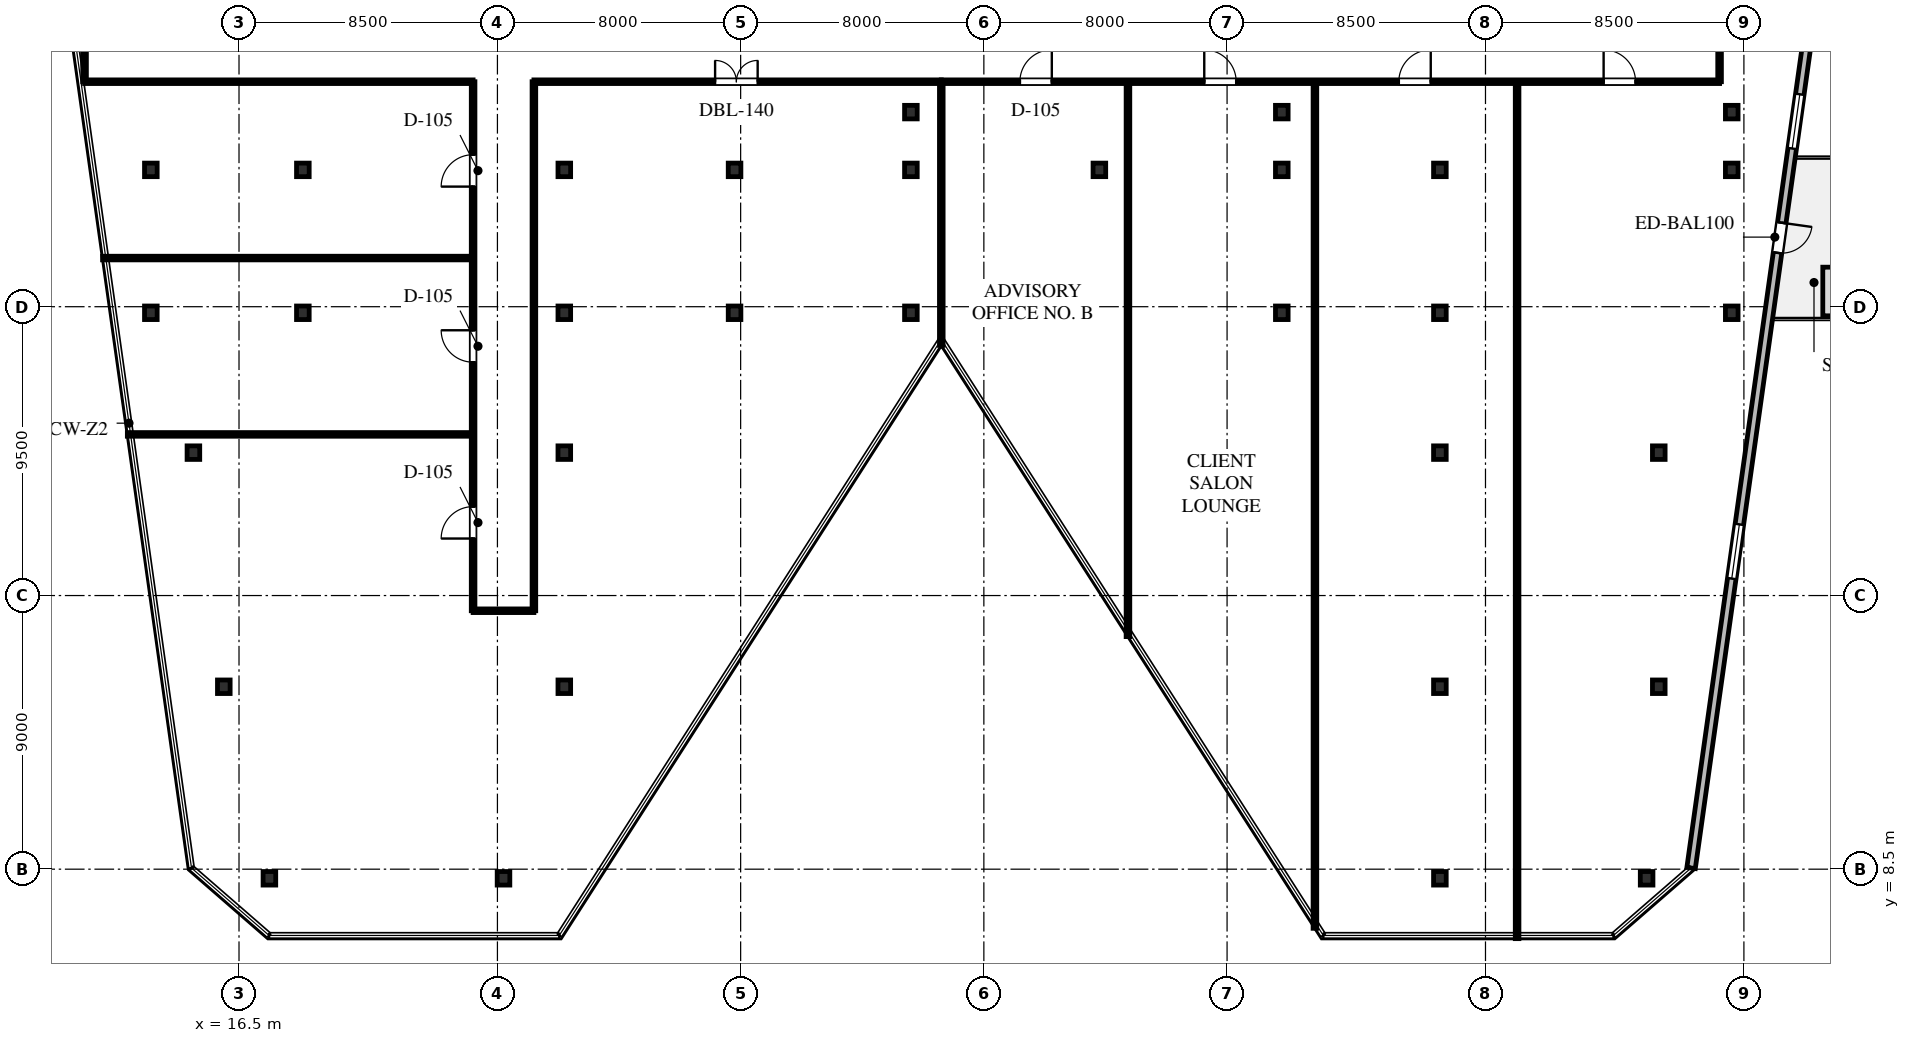
"""IFC4 building model, lengths in metres.
Left out: names, types, materials, properties, quantities, classifications, styles, units other than length and angle.
Written with IfcOpenShell. Run it as: python <this file> out.ifc"""

import sys

from ifc_helpers import new_model, si_unit, direction, frame, frame_2d, origin, origin_2d, place, context, subcontext, project, spatial, rectangle, i_section, extrude, element, fill, save


model = new_model("IFC4")
c1 = context("Model", 3, precision=1e-05, world=origin(), true_north=direction((0.0, 1.0)))
c2 = subcontext(c1, "Body", "Model", "MODEL_VIEW")
j1 = project(units=[si_unit("LENGTHUNIT", "METRE"), si_unit("PLANEANGLEUNIT", "RADIAN")], contexts=[c1])
p1 = place(None, origin())
s1 = spatial("IfcSite", under=j1, at=p1, CompositionType="ELEMENT")
p2 = place(p1, origin())
s2 = spatial("IfcBuilding", under=s1, at=p2, CompositionType="ELEMENT")
p3 = place(p2, frame((0.0, 0.0, 136.0)))
s3 = spatial("IfcBuildingStorey", under=s2, at=p3, CompositionType="ELEMENT", Elevation=136.0)
for number, where, z_axis, x_axis in (
    (1, (17.5, 8.2, 0.0), (0.0, 0.0, 1.0), (1.0, 0.0, 0.0)),
    (2, (13.6, 26.8, 0.0), (0.0, 0.0, 1.0), (1.0, 0.0, 0.0)),
    (3, (18.6, 26.8, 0.0), (0.0, 0.0, 1.0), (1.0, 0.0, 0.0)),
    (4, (27.2, 26.8, 0.0), (0.0, 0.0, 1.0), (1.0, 0.0, 0.0)),
    (5, (32.8, 26.8, 0.0), (0.0, 0.0, 1.0), (1.0, 0.0, 0.0)),
    (6, (38.6, 26.8, 0.0), (0.0, 0.0, 1.0), (1.0, 0.0, 0.0)),
    (7, (50.8, 26.8, 0.0), (0.0, 0.0, 1.0), (1.0, 0.0, 0.0)),
    (8, (56.0, 26.8, 0.0), (0.0, 0.0, 1.0), (1.0, 0.0, 0.0)),
    (9, (65.6, 26.8, 0.0), (0.0, 0.0, 1.0), (1.0, 0.0, 0.0)),
    (10, (13.6, 31.5, 0.0), (0.0, 0.0, 1.0), (1.0, 0.0, 0.0)),
    (11, (18.6, 31.5, 0.0), (0.0, 0.0, 1.0), (1.0, 0.0, 0.0)),
    (12, (27.2, 31.5, 0.0), (0.0, 0.0, 1.0), (1.0, 0.0, 0.0)),
    (13, (25.2, 8.2, 0.0), (0.0, 0.0, 1.0), (1.0, 0.0, 0.0)),
    (14, (32.8, 31.5, 0.0), (0.0, 0.0, 1.0), (1.0, 0.0, 0.0)),
    (15, (38.6, 31.5, 0.0), (0.0, 0.0, 1.0), (1.0, 0.0, 0.0)),
    (16, (44.8, 31.5, 0.0), (0.0, 0.0, 1.0), (1.0, 0.0, 0.0)),
    (17, (50.8, 31.5, 0.0), (0.0, 0.0, 1.0), (1.0, 0.0, 0.0)),
    (18, (56.0, 31.5, 0.0), (0.0, 0.0, 1.0), (1.0, 0.0, 0.0)),
    (19, (65.6, 31.5, 0.0), (0.0, 0.0, 1.0), (1.0, 0.0, 0.0)),
    (20, (56.0, 8.2, 0.0), (0.0, 0.0, 1.0), (1.0, 0.0, 0.0)),
    (21, (62.8, 8.2, 0.0), (0.0, 0.0, 1.0), (1.0, 0.0, 0.0)),
    (22, (16.0, 14.5, 0.0), (0.0, 0.0, 1.0), (1.0, 0.0, 0.0)),
    (23, (27.2, 14.5, 0.0), (0.0, 0.0, 1.0), (1.0, 0.0, 0.0)),
    (24, (56.0, 14.5, 0.0), (0.0, 0.0, 1.0), (1.0, 0.0, 0.0)),
    (25, (63.2, 14.5, 0.0), (0.0, 0.0, 1.0), (1.0, 0.0, 0.0)),
    (26, (15.0, 22.2, 0.0), (0.0, 0.0, 1.0), (1.0, 0.0, 0.0)),
    (27, (27.2, 22.2, 0.0), (0.0, 0.0, 1.0), (1.0, 0.0, 0.0)),
    (28, (56.0, 22.2, 0.0), (0.0, 0.0, 1.0), (1.0, 0.0, 0.0)),
    (29, (63.2, 22.2, 0.0), (0.0, 0.0, 1.0), (1.0, 0.0, 0.0)),
    (30, (38.6, 33.4, 0.0), (0.0, 0.0, 1.0), (1.0, 0.0, 0.0)),
    (31, (50.8, 33.4, 0.0), (0.0, 0.0, 1.0), (1.0, 0.0, 0.0)),
    (32, (65.6, 33.4, 0.0), (0.0, 0.0, 1.0), (1.0, 0.0, 0.0)),
):
    element("IfcColumn", number, at=place(p3, frame(where, z_axis=z_axis, x_axis=x_axis)), inside=s3, PredefinedType="COLUMN", context=c2, shape_type="SweptSolid", body=[
        extrude(i_section(OverallWidth=0.416, OverallDepth=0.446, WebThickness=0.039, FlangeThickness=0.063, FilletRadius=0.03, at=origin_2d()), origin(), (0.0, 0.0, 1.0), 4.0),
    ])
p4 = place(p3, frame((68.375, 37.8, 0.0), z_axis=(0.0, 0.0, 1.0), x_axis=(-0.13917001236, -0.990268502811, 0.0)))
e33 = element("IfcWall", 33, at=p4, inside=s3, PredefinedType="STANDARD", context=c2, shape_type="SweptSolid", body=[
    extrude(rectangle(XDim=29.549, YDim=0.28, at=frame_2d((14.774, 0.0))), origin(), (0.0, 0.0, 1.0), 3.75),
])
p5 = place(p4, frame((8.117, 0.0, 0.0)))
e34 = element("IfcOpeningElement", 34, at=p5, cuts=e33, PredefinedType="OPENING", context=c2, shape_type="SweptSolid", body=[
    extrude(rectangle(XDim=1.0, YDim=2.15, at=frame_2d((0.5, 1.075))), frame((0.0, 0.15, 0.0), z_axis=(0.0, -1.0, 0.0), x_axis=(1.0, 0.0, 0.0)), (0.0, 0.0, 1.0), 0.3),
])
p6 = place(p4, frame((3.851, 0.0, 0.65)))
e35 = element("IfcOpeningElement", 35, at=p6, cuts=e33, PredefinedType="OPENING", context=c2, shape_type="SweptSolid", body=[
    extrude(rectangle(XDim=1.8, YDim=2.1, at=frame_2d((0.9, 1.05))), frame((0.0, 0.15, 0.0), z_axis=(0.0, -1.0, 0.0), x_axis=(1.0, 0.0, 0.0)), (0.0, 0.0, 1.0), 0.3),
])
p7 = place(p4, frame((18.136, 0.0, 0.65)))
e36 = element("IfcOpeningElement", 36, at=p7, cuts=e33, PredefinedType="OPENING", context=c2, shape_type="SweptSolid", body=[
    extrude(rectangle(XDim=1.8, YDim=2.1, at=frame_2d((0.9, 1.05))), frame((0.0, 0.15, 0.0), z_axis=(0.0, -1.0, 0.0), x_axis=(1.0, 0.0, 0.0)), (0.0, 0.0, 1.0), 0.3),
])
p8 = place(p3, frame((11.42, 34.4, 0.0), z_axis=(0.0, 0.0, 1.0), x_axis=(1.0, 0.0, 0.0)))
e37 = element("IfcWall", 37, at=p8, inside=s3, PredefinedType="PARTITIONING", context=c2, shape_type="SweptSolid", body=[
    extrude(rectangle(XDim=12.78, YDim=0.12, at=frame_2d((6.39, 0.0))), origin(), (0.0, 0.0, 1.0), 2.894),
])
p9 = place(p3, frame((26.2, 34.4, 0.0), z_axis=(0.0, 0.0, 1.0), x_axis=(1.0, 0.0, 0.0)))
e38 = element("IfcWall", 38, at=p9, inside=s3, PredefinedType="PARTITIONING", context=c2, shape_type="SweptSolid", body=[
    extrude(rectangle(XDim=13.4, YDim=0.12, at=frame_2d((6.7, 0.0))), origin(), (0.0, 0.0, 1.0), 2.894),
])
p10 = place(p9, frame((5.96, 0.0, 0.0)))
e39 = element("IfcOpeningElement", 39, at=p10, cuts=e38, PredefinedType="OPENING", context=c2, shape_type="SweptSolid", body=[
    extrude(rectangle(XDim=1.4, YDim=2.2, at=frame_2d((0.7, 1.1))), frame((0.0, 0.07, 0.0), z_axis=(0.0, -1.0, 0.0), x_axis=(1.0, 0.0, 0.0)), (0.0, 0.0, 1.0), 0.14),
])
p11 = place(p3, frame((39.6, 34.4, 0.0), z_axis=(0.0, 0.0, 1.0), x_axis=(1.0, 0.0, 0.0)))
e40 = element("IfcWall", 40, at=p11, inside=s3, PredefinedType="PARTITIONING", context=c2, shape_type="SweptSolid", body=[
    extrude(rectangle(XDim=25.6, YDim=0.12, at=frame_2d((12.8, 0.0))), origin(), (0.0, 0.0, 1.0), 2.894),
])
p12 = place(p11, frame((2.585, 0.0, 0.0)))
e41 = element("IfcOpeningElement", 41, at=p12, cuts=e40, PredefinedType="OPENING", context=c2, shape_type="SweptSolid", body=[
    extrude(rectangle(XDim=1.05, YDim=2.2, at=frame_2d((0.525, 1.1))), frame((0.0, 0.07, 0.0), z_axis=(0.0, -1.0, 0.0), x_axis=(1.0, 0.0, 0.0)), (0.0, 0.0, 1.0), 0.14),
])
p13 = place(p11, frame((8.65, 0.0, 0.0)))
e42 = element("IfcOpeningElement", 42, at=p13, cuts=e40, PredefinedType="OPENING", context=c2, shape_type="SweptSolid", body=[
    extrude(rectangle(XDim=1.05, YDim=2.2, at=frame_2d((0.525, 1.1))), frame((0.0, 0.07, 0.0), z_axis=(0.0, -1.0, 0.0), x_axis=(1.0, 0.0, 0.0)), (0.0, 0.0, 1.0), 0.14),
])
p14 = place(p11, frame((15.05, 0.0, 0.0)))
e43 = element("IfcOpeningElement", 43, at=p14, cuts=e40, PredefinedType="OPENING", context=c2, shape_type="SweptSolid", body=[
    extrude(rectangle(XDim=1.05, YDim=2.2, at=frame_2d((0.525, 1.1))), frame((0.0, 0.07, 0.0), z_axis=(0.0, -1.0, 0.0), x_axis=(1.0, 0.0, 0.0)), (0.0, 0.0, 1.0), 0.14),
])
p15 = place(p11, frame((21.786, 0.0, 0.0)))
e44 = element("IfcOpeningElement", 44, at=p15, cuts=e40, PredefinedType="OPENING", context=c2, shape_type="SweptSolid", body=[
    extrude(rectangle(XDim=1.05, YDim=2.2, at=frame_2d((0.525, 1.1))), frame((0.0, 0.07, 0.0), z_axis=(0.0, -1.0, 0.0), x_axis=(1.0, 0.0, 0.0)), (0.0, 0.0, 1.0), 0.14),
])
p16 = place(p3, frame((11.42, 34.4, 0.0), z_axis=(0.0, 0.0, 1.0), x_axis=(0.0, 1.0, 0.0)))
e45 = element("IfcWall", 45, at=p16, inside=s3, PredefinedType="PARTITIONING", context=c2, shape_type="SweptSolid", body=[
    extrude(rectangle(XDim=3.65, YDim=0.12, at=frame_2d((1.825, 0.0))), origin(), (0.0, 0.0, 1.0), 3.75),
])
p17 = place(p3, frame((65.2, 34.4, 0.0), z_axis=(0.0, 0.0, 1.0), x_axis=(0.0, 1.0, 0.0)))
e46 = element("IfcWall", 46, at=p17, inside=s3, PredefinedType="PARTITIONING", context=c2, shape_type="SweptSolid", body=[
    extrude(rectangle(XDim=3.267, YDim=0.12, at=frame_2d((1.634, 0.0))), origin(), (0.0, 0.0, 1.0), 2.894),
])
p18 = place(p3, frame((24.2, 17.0, 0.0), z_axis=(0.0, 0.0, 1.0), x_axis=(0.0, 1.0, 0.0)))
e47 = element("IfcWall", 47, at=p18, inside=s3, PredefinedType="PARTITIONING", context=c2, shape_type="SweptSolid", body=[
    extrude(rectangle(XDim=17.4, YDim=0.12, at=frame_2d((8.7, 0.0))), origin(), (0.0, 0.0, 1.0), 2.894),
])
p19 = place(p18, frame((2.375, 0.0, 0.0)))
e48 = element("IfcOpeningElement", 48, at=p19, cuts=e47, PredefinedType="OPENING", context=c2, shape_type="SweptSolid", body=[
    extrude(rectangle(XDim=1.05, YDim=2.2, at=frame_2d((0.525, 1.1))), frame((0.0, 0.07, 0.0), z_axis=(0.0, -1.0, 0.0), x_axis=(1.0, 0.0, 0.0)), (0.0, 0.0, 1.0), 0.14),
])
p20 = place(p18, frame((8.175, 0.0, 0.0)))
e49 = element("IfcOpeningElement", 49, at=p20, cuts=e47, PredefinedType="OPENING", context=c2, shape_type="SweptSolid", body=[
    extrude(rectangle(XDim=1.05, YDim=2.2, at=frame_2d((0.525, 1.1))), frame((0.0, 0.07, 0.0), z_axis=(0.0, -1.0, 0.0), x_axis=(1.0, 0.0, 0.0)), (0.0, 0.0, 1.0), 0.14),
])
p21 = place(p18, frame((13.95, 0.0, 0.0)))
e50 = element("IfcOpeningElement", 50, at=p21, cuts=e47, PredefinedType="OPENING", context=c2, shape_type="SweptSolid", body=[
    extrude(rectangle(XDim=1.05, YDim=2.2, at=frame_2d((0.525, 1.1))), frame((0.0, 0.07, 0.0), z_axis=(0.0, -1.0, 0.0), x_axis=(1.0, 0.0, 0.0)), (0.0, 0.0, 1.0), 0.14),
])
p22 = place(p3, frame((26.2, 17.0, 0.0), z_axis=(0.0, 0.0, 1.0), x_axis=(0.0, 1.0, 0.0)))
e51 = element("IfcWall", 51, at=p22, inside=s3, PredefinedType="PARTITIONING", context=c2, shape_type="SweptSolid", body=[
    extrude(rectangle(XDim=17.4, YDim=0.12, at=frame_2d((8.7, 0.0))), origin(), (0.0, 0.0, 1.0), 2.894),
])
p23 = place(p3, frame((24.2, 17.0, 0.0), z_axis=(0.0, 0.0, 1.0), x_axis=(1.0, 0.0, 0.0)))
e52 = element("IfcWall", 52, at=p23, inside=s3, PredefinedType="PARTITIONING", context=c2, shape_type="SweptSolid", body=[
    extrude(rectangle(XDim=2.0, YDim=0.12, at=frame_2d((1.0, 0.0))), origin(), (0.0, 0.0, 1.0), 3.75),
])
p24 = place(p3, frame((12.827, 22.8, 0.0), z_axis=(0.0, 0.0, 1.0), x_axis=(1.0, 0.0, 0.0)))
e53 = element("IfcWall", 53, at=p24, inside=s3, PredefinedType="PARTITIONING", context=c2, shape_type="SweptSolid", body=[
    extrude(rectangle(XDim=11.305, YDim=0.12, at=frame_2d((5.652, 0.0))), origin(), (0.0, 0.0, 1.0), 3.142),
])
p25 = place(p3, frame((12.012, 28.6, 0.0), z_axis=(0.0, 0.0, 1.0), x_axis=(1.0, 0.0, 0.0)))
e54 = element("IfcWall", 54, at=p25, inside=s3, PredefinedType="PARTITIONING", context=c2, shape_type="SweptSolid", body=[
    extrude(rectangle(XDim=12.12, YDim=0.12, at=frame_2d((6.06, 0.0))), origin(), (0.0, 0.0, 1.0), 2.894),
])
p26 = place(p3, frame((39.6, 25.728, 0.0), z_axis=(0.0, 0.0, 1.0), x_axis=(0.0, 1.0, 0.0)))
e55 = element("IfcWall", 55, at=p26, inside=s3, PredefinedType="PARTITIONING", context=c2, shape_type="SweptSolid", body=[
    extrude(rectangle(XDim=8.672, YDim=0.12, at=frame_2d((4.336, 0.0))), origin(), (0.0, 0.0, 1.0), 2.894),
])
p27 = place(p3, frame((45.74, 16.149, 0.0), z_axis=(0.0, 0.0, 1.0), x_axis=(0.0, 1.0, 0.0)))
e56 = element("IfcWall", 56, at=p27, inside=s3, PredefinedType="PARTITIONING", context=c2, shape_type="SweptSolid", body=[
    extrude(rectangle(XDim=18.183, YDim=0.12, at=frame_2d((9.091, 0.0))), origin(), (0.0, 0.0, 1.0), 2.894),
])
p28 = place(p3, frame((51.89, 6.555, 0.0), z_axis=(0.0, 0.0, 1.0), x_axis=(0.0, 1.0, 0.0)))
e57 = element("IfcWall", 57, at=p28, inside=s3, PredefinedType="PARTITIONING", context=c2, shape_type="SweptSolid", body=[
    extrude(rectangle(XDim=27.777, YDim=0.12, at=frame_2d((13.888, 0.0))), origin(), (0.0, 0.0, 1.0), 2.894),
])
p29 = place(p3, frame((58.54, 6.215, 0.0), z_axis=(0.0, 0.0, 1.0), x_axis=(0.0, 1.0, 0.0)))
e58 = element("IfcWall", 58, at=p29, inside=s3, PredefinedType="PARTITIONING", context=c2, shape_type="SweptSolid", body=[
    extrude(rectangle(XDim=28.117, YDim=0.12, at=frame_2d((14.059, 0.0))), origin(), (0.0, 0.0, 1.0), 2.894),
])
p30 = place(p5, origin())
e59 = element("IfcDoor", 59, at=p30, inside=s3, OperationType="SINGLE_SWING_LEFT", PredefinedType="DOOR", context=c2, shape_type="SweptSolid", body=[
    extrude(rectangle(XDim=1.0, YDim=2.15, at=frame_2d((0.5, 1.075))), frame((0.0, 0.025, 0.0), z_axis=(0.0, -1.0, 0.0), x_axis=(1.0, 0.0, 0.0)), (0.0, 0.0, 1.0), 0.05),
])
fill(e34, e59)
p31 = place(p6, origin())
e60 = element("IfcWindow", 60, at=p31, inside=s3, PartitioningType="SINGLE_PANEL", PredefinedType="WINDOW", context=c2, shape_type="SweptSolid", body=[
    extrude(rectangle(XDim=1.8, YDim=2.1, at=frame_2d((0.9, 1.05))), frame((0.0, 0.03, 0.0), z_axis=(0.0, -1.0, 0.0), x_axis=(1.0, 0.0, 0.0)), (0.0, 0.0, 1.0), 0.06),
])
fill(e35, e60)
p32 = place(p7, origin())
e61 = element("IfcWindow", 61, at=p32, inside=s3, PartitioningType="SINGLE_PANEL", PredefinedType="WINDOW", context=c2, shape_type="SweptSolid", body=[
    extrude(rectangle(XDim=1.8, YDim=2.1, at=frame_2d((0.9, 1.05))), frame((0.0, 0.03, 0.0), z_axis=(0.0, -1.0, 0.0), x_axis=(1.0, 0.0, 0.0)), (0.0, 0.0, 1.0), 0.06),
])
fill(e36, e61)
p33 = place(p19, origin())
e62 = element("IfcDoor", 62, at=p33, inside=s3, OperationType="SINGLE_SWING_LEFT", PredefinedType="DOOR", context=c2, shape_type="SweptSolid", body=[
    extrude(rectangle(XDim=1.05, YDim=2.2, at=frame_2d((0.525, 1.1))), frame((0.0, 0.025, 0.0), z_axis=(0.0, -1.0, 0.0), x_axis=(1.0, 0.0, 0.0)), (0.0, 0.0, 1.0), 0.05),
])
fill(e48, e62)
p34 = place(p20, origin())
e63 = element("IfcDoor", 63, at=p34, inside=s3, OperationType="SINGLE_SWING_RIGHT", PredefinedType="DOOR", context=c2, shape_type="SweptSolid", body=[
    extrude(rectangle(XDim=1.05, YDim=2.2, at=frame_2d((0.525, 1.1))), frame((0.0, 0.025, 0.0), z_axis=(0.0, -1.0, 0.0), x_axis=(1.0, 0.0, 0.0)), (0.0, 0.0, 1.0), 0.05),
])
fill(e49, e63)
p35 = place(p21, origin())
e64 = element("IfcDoor", 64, at=p35, inside=s3, OperationType="SINGLE_SWING_LEFT", PredefinedType="DOOR", context=c2, shape_type="SweptSolid", body=[
    extrude(rectangle(XDim=1.05, YDim=2.2, at=frame_2d((0.525, 1.1))), frame((0.0, 0.025, 0.0), z_axis=(0.0, -1.0, 0.0), x_axis=(1.0, 0.0, 0.0)), (0.0, 0.0, 1.0), 0.05),
])
fill(e50, e64)
p36 = place(p10, origin())
e65 = element("IfcDoor", 65, at=p36, inside=s3, OperationType="DOUBLE_DOOR_SINGLE_SWING", PredefinedType="DOOR", context=c2, shape_type="SweptSolid", body=[
    extrude(rectangle(XDim=1.4, YDim=2.2, at=frame_2d((0.7, 1.1))), frame((0.0, 0.025, 0.0), z_axis=(0.0, -1.0, 0.0), x_axis=(1.0, 0.0, 0.0)), (0.0, 0.0, 1.0), 0.05),
])
fill(e39, e65)
p37 = place(p12, origin())
e66 = element("IfcDoor", 66, at=p37, inside=s3, OperationType="SINGLE_SWING_RIGHT", PredefinedType="DOOR", context=c2, shape_type="SweptSolid", body=[
    extrude(rectangle(XDim=1.05, YDim=2.2, at=frame_2d((0.525, 1.1))), frame((0.0, 0.025, 0.0), z_axis=(0.0, -1.0, 0.0), x_axis=(1.0, 0.0, 0.0)), (0.0, 0.0, 1.0), 0.05),
])
fill(e41, e66)
p38 = place(p13, origin())
e67 = element("IfcDoor", 67, at=p38, inside=s3, OperationType="SINGLE_SWING_LEFT", PredefinedType="DOOR", context=c2, shape_type="SweptSolid", body=[
    extrude(rectangle(XDim=1.05, YDim=2.2, at=frame_2d((0.525, 1.1))), frame((0.0, 0.025, 0.0), z_axis=(0.0, -1.0, 0.0), x_axis=(1.0, 0.0, 0.0)), (0.0, 0.0, 1.0), 0.05),
])
fill(e42, e67)
p39 = place(p14, origin())
e68 = element("IfcDoor", 68, at=p39, inside=s3, OperationType="SINGLE_SWING_RIGHT", PredefinedType="DOOR", context=c2, shape_type="SweptSolid", body=[
    extrude(rectangle(XDim=1.05, YDim=2.2, at=frame_2d((0.525, 1.1))), frame((0.0, 0.025, 0.0), z_axis=(0.0, -1.0, 0.0), x_axis=(1.0, 0.0, 0.0)), (0.0, 0.0, 1.0), 0.05),
])
fill(e43, e68)
p40 = place(p15, origin())
e69 = element("IfcDoor", 69, at=p40, inside=s3, OperationType="SINGLE_SWING_LEFT", PredefinedType="DOOR", context=c2, shape_type="SweptSolid", body=[
    extrude(rectangle(XDim=1.05, YDim=2.2, at=frame_2d((0.525, 1.1))), frame((0.0, 0.025, 0.0), z_axis=(0.0, -1.0, 0.0), x_axis=(1.0, 0.0, 0.0)), (0.0, 0.0, 1.0), 0.05),
])
fill(e44, e69)
save(model, sys.argv[1])
